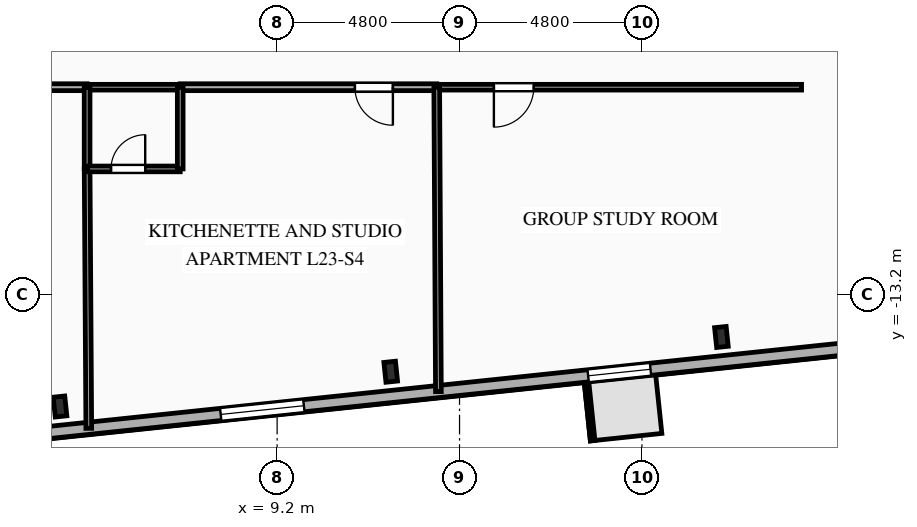
"""IFC4 building model, lengths in metres.
Left out: names, types, materials, properties, quantities, classifications, styles, units other than length and angle.
Written with IfcOpenShell. Run it as: python <this file> out.ifc"""

import sys

from ifc_helpers import new_model, si_unit, direction, frame, frame_2d, origin, origin_2d, place, context, subcontext, project, spatial, rectangle, i_section, extrude, element, fill, save


model = new_model("IFC4")
c1 = context("Model", 3, precision=1e-05, world=origin(), true_north=direction((0.0, 1.0)))
c2 = subcontext(c1, "Body", "Model", "MODEL_VIEW")
j1 = project(units=[si_unit("LENGTHUNIT", "METRE"), si_unit("PLANEANGLEUNIT", "RADIAN")], contexts=[c1])
p1 = place(None, origin())
s1 = spatial("IfcSite", under=j1, at=p1, CompositionType="ELEMENT")
p2 = place(p1, origin())
s2 = spatial("IfcBuilding", under=s1, at=p2, CompositionType="ELEMENT")
p3 = place(p2, frame((0.0, 0.0, 85.7)))
s3 = spatial("IfcBuildingStorey", under=s2, at=p3, CompositionType="ELEMENT", Elevation=85.7)
for number, where, z_axis, x_axis in (
    (1, (3.487, -16.151, 0.0), (0.0, 0.0, 1.0), (0.995, 0.105, 0.0)),
    (2, (12.189, -15.237, 0.0), (0.0, 0.0, 1.0), (0.995, 0.105, 0.0)),
    (3, (20.891, -14.322, 0.0), (0.0, 0.0, 1.0), (0.995, 0.105, 0.0)),
):
    element("IfcColumn", number, at=place(p3, frame(where, z_axis=z_axis, x_axis=x_axis)), inside=s3, PredefinedType="COLUMN", context=c2, shape_type="SweptSolid", body=[
        extrude(i_section(OverallWidth=0.306, OverallDepth=0.524, WebThickness=0.021, FlangeThickness=0.04, FilletRadius=0.027, at=origin_2d()), origin(), (0.0, 0.0, 1.0), 3.35),
    ])
p4 = place(p3, frame((30.307, -13.986, 0.0), z_axis=(0.0, 0.0, 1.0), x_axis=(-0.994521628355, -0.104531003701, 0.0)))
e4 = element("IfcWall", 4, at=p4, inside=s3, PredefinedType="SOLIDWALL", context=c2, shape_type="SweptSolid", body=[
    extrude(rectangle(XDim=53.8, YDim=0.32, at=frame_2d((26.9, 0.0))), origin(), (0.0, 0.0, 1.0), 3.045),
])
p5 = place(p4, frame((11.344, 0.0, 0.85)))
e5 = element("IfcOpeningElement", 5, at=p5, cuts=e4, PredefinedType="OPENING", context=c2, shape_type="SweptSolid", body=[
    extrude(rectangle(XDim=1.65, YDim=1.85, at=frame_2d((0.825, 0.925))), frame((0.0, 0.17, 0.0), z_axis=(0.0, -1.0, 0.0), x_axis=(1.0, 0.0, 0.0)), (0.0, 0.0, 1.0), 0.34),
])
p6 = place(p4, frame((20.516, 0.0, 0.85)))
e6 = element("IfcOpeningElement", 6, at=p6, cuts=e4, PredefinedType="OPENING", context=c2, shape_type="SweptSolid", body=[
    extrude(rectangle(XDim=2.2, YDim=1.85, at=frame_2d((1.1, 0.925))), frame((0.0, 0.17, 0.0), z_axis=(0.0, -1.0, 0.0), x_axis=(1.0, 0.0, 0.0)), (0.0, 0.0, 1.0), 0.34),
])
p7 = place(p4, frame((29.763, 0.0, 0.85)))
e7 = element("IfcOpeningElement", 7, at=p7, cuts=e4, PredefinedType="OPENING", context=c2, shape_type="SweptSolid", body=[
    extrude(rectangle(XDim=2.2, YDim=1.85, at=frame_2d((1.1, 0.925))), frame((0.0, 0.17, 0.0), z_axis=(0.0, -1.0, 0.0), x_axis=(1.0, 0.0, 0.0)), (0.0, 0.0, 1.0), 0.34),
])
p8 = place(p4, frame((39.01, 0.0, 0.85)))
e8 = element("IfcOpeningElement", 8, at=p8, cuts=e4, PredefinedType="OPENING", context=c2, shape_type="SweptSolid", body=[
    extrude(rectangle(XDim=2.2, YDim=1.85, at=frame_2d((1.1, 0.925))), frame((0.0, 0.17, 0.0), z_axis=(0.0, -1.0, 0.0), x_axis=(1.0, 0.0, 0.0)), (0.0, 0.0, 1.0), 0.34),
])
p9 = place(p4, frame((46.13, 0.0, 0.85)))
e9 = element("IfcOpeningElement", 9, at=p9, cuts=e4, PredefinedType="OPENING", context=c2, shape_type="SweptSolid", body=[
    extrude(rectangle(XDim=1.65, YDim=1.85, at=frame_2d((0.825, 0.925))), frame((0.0, 0.17, 0.0), z_axis=(0.0, -1.0, 0.0), x_axis=(1.0, 0.0, 0.0)), (0.0, 0.0, 1.0), 0.34),
])
p10 = place(p4, frame((50.453, 0.0, 0.85)))
e10 = element("IfcOpeningElement", 10, at=p10, cuts=e4, PredefinedType="OPENING", context=c2, shape_type="SweptSolid", body=[
    extrude(rectangle(XDim=1.65, YDim=1.85, at=frame_2d((0.825, 0.925))), frame((0.0, 0.17, 0.0), z_axis=(0.0, -1.0, 0.0), x_axis=(1.0, 0.0, 0.0)), (0.0, 0.0, 1.0), 0.34),
])
p11 = place(p3, frame((4.2, -7.75, 0.0), z_axis=(0.0, 0.0, 1.0), x_axis=(-1.0, 0.0, 0.0)))
e11 = element("IfcWall", 11, at=p11, inside=s3, PredefinedType="PARTITIONING", context=c2, shape_type="SweptSolid", body=[
    extrude(rectangle(XDim=4.2, YDim=0.18, at=frame_2d((2.1, 0.0))), origin(), (0.0, 0.0, 1.0), 3.045),
])
p12 = place(p11, frame((2.365, 0.0, 0.0)))
e12 = element("IfcOpeningElement", 12, at=p12, cuts=e11, PredefinedType="OPENING", context=c2, shape_type="SweptSolid", body=[
    extrude(rectangle(XDim=1.0, YDim=2.15, at=frame_2d((0.5, 1.075))), frame((0.0, 0.1, 0.0), z_axis=(0.0, -1.0, 0.0), x_axis=(1.0, 0.0, 0.0)), (0.0, 0.0, 1.0), 0.2),
])
p13 = place(p3, frame((13.4, -7.75, 0.0), z_axis=(0.0, 0.0, 1.0), x_axis=(-1.0, 0.0, 0.0)))
e13 = element("IfcWall", 13, at=p13, inside=s3, PredefinedType="PARTITIONING", context=c2, shape_type="SweptSolid", body=[
    extrude(rectangle(XDim=6.75, YDim=0.18, at=frame_2d((3.375, 0.0))), origin(), (0.0, 0.0, 1.0), 3.045),
])
p14 = place(p13, frame((1.154, 0.0, 0.0)))
e14 = element("IfcOpeningElement", 14, at=p14, cuts=e13, PredefinedType="OPENING", context=c2, shape_type="SweptSolid", body=[
    extrude(rectangle(XDim=1.0, YDim=2.15, at=frame_2d((0.5, 1.075))), frame((0.0, 0.1, 0.0), z_axis=(0.0, -1.0, 0.0), x_axis=(1.0, 0.0, 0.0)), (0.0, 0.0, 1.0), 0.2),
])
p15 = place(p3, frame((6.65, -7.75, 0.0), z_axis=(0.0, 0.0, 1.0), x_axis=(-1.0, 0.0, 0.0)))
e15 = element("IfcWall", 15, at=p15, inside=s3, PredefinedType="PLUMBINGWALL", context=c2, shape_type="SweptSolid", body=[
    extrude(rectangle(XDim=2.45, YDim=0.15, at=frame_2d((1.225, 0.0))), origin(), (0.0, 0.0, 1.0), 3.045),
])
p16 = place(p3, frame((23.0, -7.75, 0.0), z_axis=(0.0, 0.0, 1.0), x_axis=(-1.0, 0.0, 0.0)))
e16 = element("IfcWall", 16, at=p16, inside=s3, PredefinedType="PARTITIONING", context=c2, shape_type="SweptSolid", body=[
    extrude(rectangle(XDim=9.6, YDim=0.15, at=frame_2d((4.8, 0.0))), origin(), (0.0, 0.0, 1.0), 3.045),
])
p17 = place(p16, frame((7.046, 0.0, 0.0)))
e17 = element("IfcOpeningElement", 17, at=p17, cuts=e16, PredefinedType="OPENING", context=c2, shape_type="SweptSolid", body=[
    extrude(rectangle(XDim=1.05, YDim=2.15, at=frame_2d((0.525, 1.075))), frame((0.0, 0.085, 0.0), z_axis=(0.0, -1.0, 0.0), x_axis=(1.0, 0.0, 0.0)), (0.0, 0.0, 1.0), 0.17),
])
p18 = place(p3, frame((4.2, -9.9, 0.0), z_axis=(0.0, 0.0, 1.0), x_axis=(0.00643855591, -0.999979272284, 0.0)))
e18 = element("IfcWall", 18, at=p18, inside=s3, PredefinedType="PARTITIONING", context=c2, shape_type="SweptSolid", body=[
    extrude(rectangle(XDim=6.825, YDim=0.15, at=frame_2d((3.413, 0.0))), origin(), (0.0, 0.0, 1.0), 3.045),
])
p19 = place(p3, frame((4.2, -7.75, 0.0), z_axis=(0.0, 0.0, 1.0), x_axis=(0.0, -1.0, 0.0)))
e19 = element("IfcWall", 19, at=p19, inside=s3, PredefinedType="PLUMBINGWALL", context=c2, shape_type="SweptSolid", body=[
    extrude(rectangle(XDim=2.15, YDim=0.15, at=frame_2d((1.075, 0.0))), origin(), (0.0, 0.0, 1.0), 3.045),
])
p20 = place(p3, frame((4.2, -9.9, 0.0), z_axis=(0.0, 0.0, 1.0), x_axis=(1.0, 0.0, 0.0)))
e20 = element("IfcWall", 20, at=p20, inside=s3, PredefinedType="PLUMBINGWALL", context=c2, shape_type="SweptSolid", body=[
    extrude(rectangle(XDim=2.45, YDim=0.15, at=frame_2d((1.225, 0.0))), origin(), (0.0, 0.0, 1.0), 3.045),
])
p21 = place(p20, frame((0.629, 0.0, 0.0)))
e21 = element("IfcOpeningElement", 21, at=p21, cuts=e20, PredefinedType="OPENING", context=c2, shape_type="SweptSolid", body=[
    extrude(rectangle(XDim=0.9, YDim=2.1, at=frame_2d((0.45, 1.05))), frame((0.0, 0.085, 0.0), z_axis=(0.0, -1.0, 0.0), x_axis=(1.0, 0.0, 0.0)), (0.0, 0.0, 1.0), 0.17),
])
p22 = place(p3, frame((6.65, -9.9, 0.0), z_axis=(0.0, 0.0, 1.0), x_axis=(0.0, 1.0, 0.0)))
e22 = element("IfcWall", 22, at=p22, inside=s3, PredefinedType="PLUMBINGWALL", context=c2, shape_type="SweptSolid", body=[
    extrude(rectangle(XDim=2.15, YDim=0.15, at=frame_2d((1.075, 0.0))), origin(), (0.0, 0.0, 1.0), 3.045),
])
p23 = place(p3, frame((13.4, -7.75, 0.0), z_axis=(0.0, 0.0, 1.0), x_axis=(0.005487554946, -0.999984943257, 0.0)))
e23 = element("IfcWall", 23, at=p23, inside=s3, PredefinedType="PARTITIONING", context=c2, shape_type="SweptSolid", body=[
    extrude(rectangle(XDim=8.008, YDim=0.15, at=frame_2d((4.004, 0.0))), origin(), (0.0, 0.0, 1.0), 3.045),
])
p24 = place(p5, origin())
e24 = element("IfcWindow", 24, at=p24, inside=s3, PartitioningType="SINGLE_PANEL", PredefinedType="WINDOW", context=c2, shape_type="SweptSolid", body=[
    extrude(rectangle(XDim=1.65, YDim=1.85, at=frame_2d((0.825, 0.925))), frame((0.0, 0.03, 0.0), z_axis=(0.0, -1.0, 0.0), x_axis=(1.0, 0.0, 0.0)), (0.0, 0.0, 1.0), 0.06),
])
fill(e5, e24)
p25 = place(p6, origin())
e25 = element("IfcWindow", 25, at=p25, inside=s3, PartitioningType="SINGLE_PANEL", PredefinedType="WINDOW", context=c2, shape_type="SweptSolid", body=[
    extrude(rectangle(XDim=2.2, YDim=1.85, at=frame_2d((1.1, 0.925))), frame((0.0, 0.03, 0.0), z_axis=(0.0, -1.0, 0.0), x_axis=(1.0, 0.0, 0.0)), (0.0, 0.0, 1.0), 0.06),
])
fill(e6, e25)
p26 = place(p14, origin())
e26 = element("IfcDoor", 26, at=p26, inside=s3, OperationType="SINGLE_SWING_LEFT", PredefinedType="DOOR", context=c2, shape_type="SweptSolid", body=[
    extrude(rectangle(XDim=1.0, YDim=2.15, at=frame_2d((0.5, 1.075))), frame((0.0, 0.025, 0.0), z_axis=(0.0, -1.0, 0.0), x_axis=(1.0, 0.0, 0.0)), (0.0, 0.0, 1.0), 0.05),
])
fill(e14, e26)
p27 = place(p17, origin())
e27 = element("IfcDoor", 27, at=p27, inside=s3, OperationType="SINGLE_SWING_RIGHT", PredefinedType="DOOR", context=c2, shape_type="SweptSolid", body=[
    extrude(rectangle(XDim=1.05, YDim=2.15, at=frame_2d((0.525, 1.075))), frame((0.0, 0.025, 0.0), z_axis=(0.0, -1.0, 0.0), x_axis=(1.0, 0.0, 0.0)), (0.0, 0.0, 1.0), 0.05),
])
fill(e17, e27)
p28 = place(p21, origin())
e28 = element("IfcDoor", 28, at=p28, inside=s3, OperationType="SINGLE_SWING_RIGHT", PredefinedType="DOOR", context=c2, shape_type="SweptSolid", body=[
    extrude(rectangle(XDim=0.9, YDim=2.1, at=frame_2d((0.45, 1.05))), frame((0.0, 0.025, 0.0), z_axis=(0.0, -1.0, 0.0), x_axis=(1.0, 0.0, 0.0)), (0.0, 0.0, 1.0), 0.05),
])
fill(e21, e28)
save(model, sys.argv[1])
